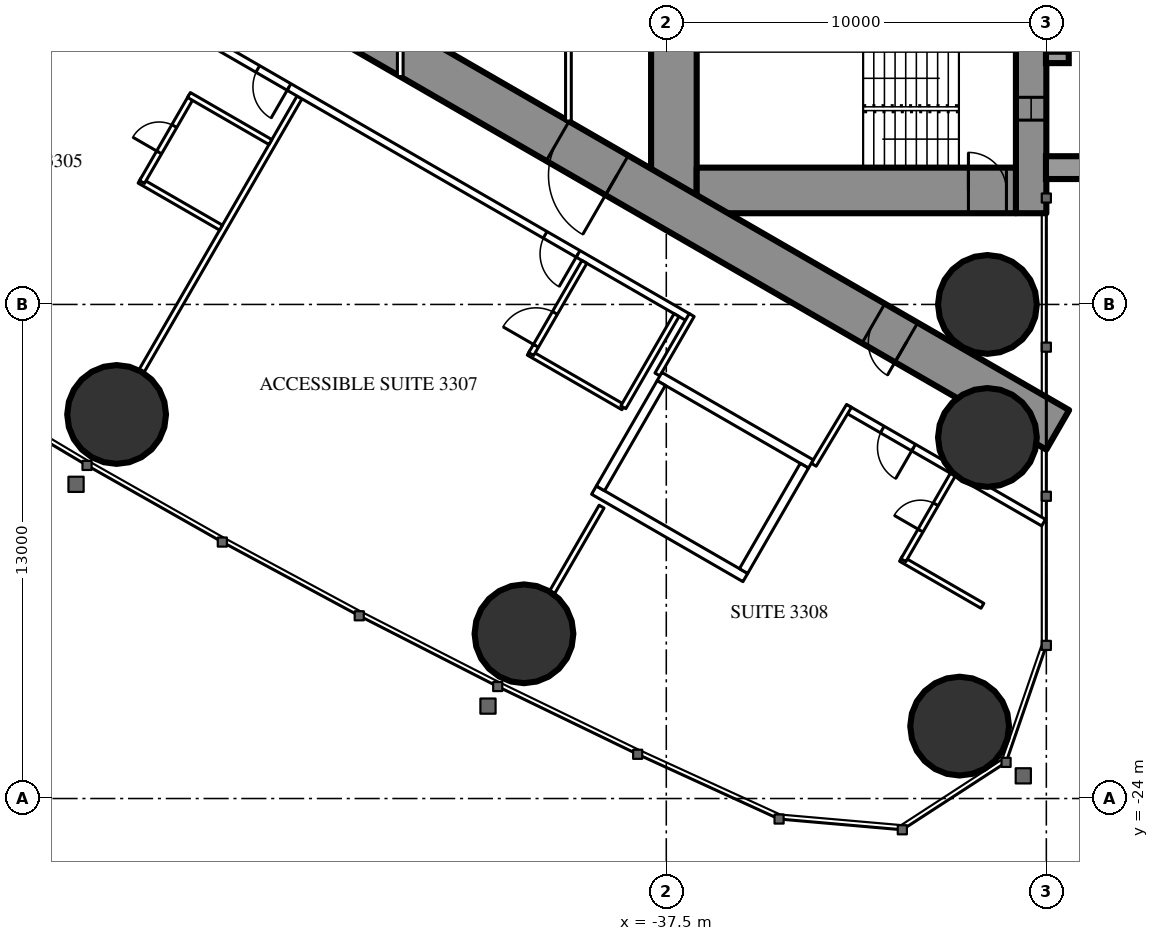
"""IFC4 building model, lengths in metres.
Left out: names, types, materials, properties, quantities, classifications, styles, units other than length and angle.
Written with IfcOpenShell. Run it as: python <this file> out.ifc"""

import sys

from ifc_helpers import new_model, si_unit, direction, frame, frame_2d, origin, origin_2d, place, context, subcontext, project, spatial, rectangle, hollow_circle, extrude, element, fill, save


model = new_model("IFC4")
c1 = context("Model", 3, precision=1e-05, world=origin(), true_north=direction((0.0, 1.0)))
c2 = subcontext(c1, "Body", "Model", "MODEL_VIEW")
j1 = project(units=[si_unit("LENGTHUNIT", "METRE"), si_unit("PLANEANGLEUNIT", "RADIAN")], contexts=[c1])
p1 = place(None, origin())
s1 = spatial("IfcSite", under=j1, at=p1, CompositionType="ELEMENT")
p2 = place(p1, origin())
s2 = spatial("IfcBuilding", under=s1, at=p2, CompositionType="ELEMENT")
p3 = place(p2, frame((0.0, 0.0, 125.6)))
s3 = spatial("IfcBuildingStorey", under=s2, at=p3, CompositionType="ELEMENT", Elevation=125.6)
for number, where, z_axis, x_axis in (
    (1, (-29.781, -22.095, 0.0), (0.0, 0.0, 1.0), (1.0, 0.0, 0.0)),
    (2, (-29.05, -11.0, 0.0), (0.0, 0.0, 1.0), (1.0, 0.0, 0.0)),
    (3, (-29.05, -14.5, 0.0), (0.0, 0.0, 1.0), (1.0, 0.0, 0.0)),
    (4, (-51.963, -13.895, 0.0), (0.0, 0.0, 1.0), (1.0, 0.0, 0.0)),
    (5, (-41.245, -19.666, 0.0), (0.0, 0.0, 1.0), (1.0, 0.0, 0.0)),
):
    element("IfcColumn", number, at=place(p3, frame(where, z_axis=z_axis, x_axis=x_axis)), inside=s3, PredefinedType="COLUMN", context=c2, shape_type="SweptSolid", body=[
        extrude(hollow_circle(Radius=1.3, WallThickness=0.1, at=origin_2d()), origin(), (0.0, 0.0, 1.0), 3.5),
    ])
p4 = place(p3, frame((-27.9, 8.6, 0.0), z_axis=(0.0, 0.0, 1.0), x_axis=(0.0, -1.0, 0.0)))
e6 = element("IfcWall", 6, at=p4, inside=s3, PredefinedType="SHEAR", context=c2, shape_type="SweptSolid", body=[
    extrude(rectangle(XDim=17.2, YDim=0.8, at=frame_2d((8.6, 0.0))), origin(), (0.0, 0.0, 1.0), 3.5),
])
p5 = place(p4, frame((2.45, 0.0, 0.6)))
e7 = element("IfcOpeningElement", 7, at=p5, cuts=e6, PredefinedType="OPENING", context=c2, shape_type="SweptSolid", body=[
    extrude(rectangle(XDim=0.6, YDim=2.1, at=frame_2d((0.3, 1.05))), frame((0.0, 0.41, 0.0), z_axis=(0.0, -1.0, 0.0), x_axis=(1.0, 0.0, 0.0)), (0.0, 0.0, 1.0), 0.82),
])
p6 = place(p4, frame((14.15, 0.0, 0.6)))
e8 = element("IfcOpeningElement", 8, at=p6, cuts=e6, PredefinedType="OPENING", context=c2, shape_type="SweptSolid", body=[
    extrude(rectangle(XDim=0.6, YDim=2.1, at=frame_2d((0.3, 1.05))), frame((0.0, 0.41, 0.0), z_axis=(0.0, -1.0, 0.0), x_axis=(1.0, 0.0, 0.0)), (0.0, 0.0, 1.0), 0.82),
])
p7 = place(p3, frame((-37.3, 8.6, 0.0), z_axis=(0.0, 0.0, 1.0), x_axis=(0.0, -1.0, 0.0)))
e9 = element("IfcWall", 9, at=p7, inside=s3, PredefinedType="SHEAR", context=c2, shape_type="SweptSolid", body=[
    extrude(rectangle(XDim=17.2, YDim=1.2, at=frame_2d((8.6, 0.0))), origin(), (0.0, 0.0, 1.0), 3.5),
])
p8 = place(p7, frame((7.7, 0.0, 0.0)))
e10 = element("IfcOpeningElement", 10, at=p8, cuts=e9, PredefinedType="OPENING", context=c2, shape_type="SweptSolid", body=[
    extrude(rectangle(XDim=1.8, YDim=2.2, at=frame_2d((0.9, 1.1))), frame((0.0, 0.61, 0.0), z_axis=(0.0, -1.0, 0.0), x_axis=(1.0, 0.0, 0.0)), (0.0, 0.0, 1.0), 1.22),
])
p9 = place(p3, frame((-28.3, -8.0, 0.0), z_axis=(0.0, 0.0, 1.0), x_axis=(-1.0, 0.0, 0.0)))
e11 = element("IfcWall", 11, at=p9, inside=s3, PredefinedType="SHEAR", context=c2, shape_type="SweptSolid", body=[
    extrude(rectangle(XDim=8.4, YDim=1.2, at=frame_2d((4.2, 0.0))), origin(), (0.0, 0.0, 1.0), 3.5),
])
p10 = place(p9, frame((0.25, 0.0, 0.0)))
e12 = element("IfcOpeningElement", 12, at=p10, cuts=e11, PredefinedType="OPENING", context=c2, shape_type="SweptSolid", body=[
    extrude(rectangle(XDim=1.0, YDim=2.2, at=frame_2d((0.5, 1.1))), frame((0.0, 0.61, 0.0), z_axis=(0.0, -1.0, 0.0), x_axis=(1.0, 0.0, 0.0)), (0.0, 0.0, 1.0), 1.22),
])
p11 = place(p3, frame((-27.2, -14.3, 0.0), z_axis=(0.0, 0.0, 1.0), x_axis=(-0.866024021859, 0.500002393557, 0.0)))
e13 = element("IfcWall", 13, at=p11, inside=s3, PredefinedType="SHEAR", context=c2, shape_type="SweptSolid", body=[
    extrude(rectangle(XDim=27.907, YDim=1.2, at=frame_2d((13.954, 0.0))), origin(), (0.0, 0.0, 1.0), 3.5),
])
p12 = place(p11, frame((4.6, 0.0, 0.0)))
e14 = element("IfcOpeningElement", 14, at=p12, cuts=e13, PredefinedType="OPENING", context=c2, shape_type="SweptSolid", body=[
    extrude(rectangle(XDim=1.0, YDim=2.2, at=frame_2d((0.5, 1.1))), frame((0.0, 0.61, 0.0), z_axis=(0.0, -1.0, 0.0), x_axis=(1.0, 0.0, 0.0)), (0.0, 0.0, 1.0), 1.22),
])
p13 = place(p11, frame((13.395, 0.0, 0.0)))
e15 = element("IfcOpeningElement", 15, at=p13, cuts=e13, PredefinedType="OPENING", context=c2, shape_type="SweptSolid", body=[
    extrude(rectangle(XDim=1.8, YDim=2.2, at=frame_2d((0.9, 1.1))), frame((0.0, 0.61, 0.0), z_axis=(0.0, -1.0, 0.0), x_axis=(1.0, 0.0, 0.0)), (0.0, 0.0, 1.0), 1.22),
])
p14 = place(p3, frame((-47.151, -5.552, 0.0), z_axis=(0.0, 0.0, 1.0), x_axis=(-0.500003012045, -0.866023664773, 0.0)))
e16 = element("IfcWall", 16, at=p14, inside=s3, PredefinedType="PARTITIONING", context=c2, shape_type="SweptSolid", body=[
    extrude(rectangle(XDim=8.311, YDim=0.15, at=frame_2d((4.156, 0.0))), origin(), (0.0, 0.0, 1.0), 2.2),
])
p15 = place(p3, frame((-39.202, -16.32, 0.0), z_axis=(0.0, 0.0, 1.0), x_axis=(-0.49997716683, -0.86603858612, 0.0)))
e17 = element("IfcWall", 17, at=p15, inside=s3, PredefinedType="PARTITIONING", context=c2, shape_type="SweptSolid", body=[
    extrude(rectangle(XDim=2.6, YDim=0.15, at=frame_2d((1.3, 0.0))), origin(), (0.0, 0.0, 1.0), 3.25),
])
p16 = place(p3, frame((-27.572, -16.741, 0.0), z_axis=(0.0, 0.0, 1.0), x_axis=(-0.866024464444, 0.500001626982, 0.0)))
e18 = element("IfcWall", 18, at=p16, inside=s3, PredefinedType="PARTITIONING", context=c2, shape_type="SweptSolid", body=[
    extrude(rectangle(XDim=5.955, YDim=0.2, at=frame_2d((2.978, 0.0))), origin(), (0.0, 0.0, 1.0), 3.25),
])
p17 = place(p16, frame((3.95, 0.0, 0.0)))
e19 = element("IfcOpeningElement", 19, at=p17, cuts=e18, PredefinedType="OPENING", context=c2, shape_type="SweptSolid", body=[
    extrude(rectangle(XDim=0.95, YDim=2.2, at=frame_2d((0.475, 1.1))), frame((0.0, 0.11, 0.0), z_axis=(0.0, -1.0, 0.0), x_axis=(1.0, 0.0, 0.0)), (0.0, 0.0, 1.0), 0.22),
])
p18 = place(p3, frame((-36.92, -11.344, 0.0), z_axis=(0.0, 0.0, 1.0), x_axis=(-0.866028313256, 0.499994960614, 0.0)))
e20 = element("IfcWall", 20, at=p18, inside=s3, PredefinedType="PARTITIONING", context=c2, shape_type="SweptSolid", body=[
    extrude(rectangle(XDim=22.568, YDim=0.2, at=frame_2d((11.284, 0.0))), origin(), (0.0, 0.0, 1.0), 3.25),
])
p19 = place(p18, frame((12.131, 0.0, 0.0)))
e21 = element("IfcOpeningElement", 21, at=p19, cuts=e20, PredefinedType="OPENING", context=c2, shape_type="SweptSolid", body=[
    extrude(rectangle(XDim=0.95, YDim=2.2, at=frame_2d((0.475, 1.1))), frame((0.0, 0.11, 0.0), z_axis=(0.0, -1.0, 0.0), x_axis=(1.0, 0.0, 0.0)), (0.0, 0.0, 1.0), 0.22),
])
p20 = place(p18, frame((3.35, 0.0, 0.0)))
e22 = element("IfcOpeningElement", 22, at=p20, cuts=e20, PredefinedType="OPENING", context=c2, shape_type="SweptSolid", body=[
    extrude(rectangle(XDim=1.0, YDim=2.2, at=frame_2d((0.5, 1.1))), frame((0.0, 0.11, 0.0), z_axis=(0.0, -1.0, 0.0), x_axis=(1.0, 0.0, 0.0)), (0.0, 0.0, 1.0), 0.22),
])
p21 = place(p3, frame((-36.831, -11.28, 0.0), z_axis=(0.0, 0.0, 1.0), x_axis=(-0.499937177781, -0.866061671171, 0.0)))
e23 = element("IfcWall", 23, at=p21, inside=s3, PredefinedType="PARTITIONING", context=c2, shape_type="SweptSolid", body=[
    extrude(rectangle(XDim=1.804, YDim=0.15, at=frame_2d((0.902, 0.0))), origin(), (0.0, 0.0, 1.0), 3.25),
])
p22 = place(p3, frame((-33.621, -15.218, 0.0), z_axis=(0.0, 0.0, 1.0), x_axis=(0.514336634837, 0.857588377991, 0.0)))
e24 = element("IfcWall", 24, at=p22, inside=s3, PredefinedType="PARTITIONING", context=c2, shape_type="SweptSolid", body=[
    extrude(rectangle(XDim=1.805, YDim=0.15, at=frame_2d((0.903, 0.0))), origin(), (0.0, 0.0, 1.0), 3.25),
])
p23 = place(p3, frame((-49.216, -8.979, 0.0), z_axis=(0.0, 0.0, 1.0), x_axis=(-0.866031185235, 0.4999899861, 0.0)))
e25 = element("IfcWall", 25, at=p23, inside=s3, PredefinedType="PARTITIONING", context=c2, shape_type="SweptSolid", body=[
    extrude(rectangle(XDim=2.475, YDim=0.15, at=frame_2d((1.238, 0.0))), origin(), (0.0, 0.0, 1.0), 3.25),
])
p24 = place(p3, frame((-49.995, -5.527, 0.0), z_axis=(0.0, 0.0, 1.0), x_axis=(-0.500006934395, -0.866021400173, 0.0)))
e26 = element("IfcWall", 26, at=p24, inside=s3, PredefinedType="PARTITIONING", context=c2, shape_type="SweptSolid", body=[
    extrude(rectangle(XDim=2.6, YDim=0.15, at=frame_2d((1.3, 0.0))), origin(), (0.0, 0.0, 1.0), 3.25),
])
p25 = place(p24, frame((0.9, 0.0, 0.0)))
e27 = element("IfcOpeningElement", 27, at=p25, cuts=e26, PredefinedType="OPENING", context=c2, shape_type="SweptSolid", body=[
    extrude(rectangle(XDim=0.8, YDim=2.2, at=frame_2d((0.4, 1.1))), frame((0.0, 0.085, 0.0), z_axis=(0.0, -1.0, 0.0), x_axis=(1.0, 0.0, 0.0)), (0.0, 0.0, 1.0), 0.17),
])
p26 = place(p3, frame((-47.916, -6.727, 0.0), z_axis=(0.0, 0.0, 1.0), x_axis=(-0.866031185235, 0.4999899861, 0.0)))
e28 = element("IfcWall", 28, at=p26, inside=s3, PredefinedType="PARTITIONING", context=c2, shape_type="SweptSolid", body=[
    extrude(rectangle(XDim=2.475, YDim=0.15, at=frame_2d((1.238, 0.0))), origin(), (0.0, 0.0, 1.0), 3.25),
])
p27 = place(p3, frame((-38.63, -13.705, 0.0), z_axis=(0.0, 0.0, 1.0), x_axis=(-0.866018712932, 0.500011588718, 0.0)))
e29 = element("IfcWall", 29, at=p27, inside=s3, PredefinedType="PARTITIONING", context=c2, shape_type="SweptSolid", body=[
    extrude(rectangle(XDim=2.875, YDim=0.15, at=frame_2d((1.438, 0.0))), origin(), (0.0, 0.0, 1.0), 3.25),
])
p28 = place(p3, frame((-39.655, -9.88, 0.0), z_axis=(0.0, 0.0, 1.0), x_axis=(-0.500049511043, -0.865996816683, 0.0)))
e30 = element("IfcWall", 30, at=p28, inside=s3, PredefinedType="PARTITIONING", context=c2, shape_type="SweptSolid", body=[
    extrude(rectangle(XDim=2.8, YDim=0.15, at=frame_2d((1.4, 0.0))), origin(), (0.0, 0.0, 1.0), 3.25),
])
p29 = place(p28, frame((1.55, 0.0, 0.0)))
e31 = element("IfcOpeningElement", 31, at=p29, cuts=e30, PredefinedType="OPENING", context=c2, shape_type="SweptSolid", body=[
    extrude(rectangle(XDim=1.0, YDim=2.2, at=frame_2d((0.5, 1.1))), frame((0.0, 0.085, 0.0), z_axis=(0.0, -1.0, 0.0), x_axis=(1.0, 0.0, 0.0)), (0.0, 0.0, 1.0), 0.17),
])
p30 = place(p3, frame((-37.23, -11.281, 0.0), z_axis=(0.0, 0.0, 1.0), x_axis=(-0.500049511043, -0.865996816683, 0.0)))
e32 = element("IfcWall", 32, at=p30, inside=s3, PredefinedType="PARTITIONING", context=c2, shape_type="SweptSolid", body=[
    extrude(rectangle(XDim=2.8, YDim=0.15, at=frame_2d((1.4, 0.0))), origin(), (0.0, 0.0, 1.0), 3.25),
])
p31 = place(p3, frame((-29.182, -18.929, 0.0), z_axis=(0.0, 0.0, 1.0), x_axis=(-0.866006523861, 0.500032699561, 0.0)))
e33 = element("IfcWall", 33, at=p31, inside=s3, PredefinedType="PARTITIONING", context=c2, shape_type="SweptSolid", body=[
    extrude(rectangle(XDim=2.475, YDim=0.15, at=frame_2d((1.237, 0.0))), origin(), (0.0, 0.0, 1.0), 3.25),
])
p32 = place(p3, frame((-29.96, -15.478, 0.0), z_axis=(0.0, 0.0, 1.0), x_axis=(-0.500006934395, -0.866021400173, 0.0)))
e34 = element("IfcWall", 34, at=p32, inside=s3, PredefinedType="PARTITIONING", context=c2, shape_type="SweptSolid", body=[
    extrude(rectangle(XDim=2.6, YDim=0.15, at=frame_2d((1.3, 0.0))), origin(), (0.0, 0.0, 1.0), 3.25),
])
p33 = place(p32, frame((0.9, 0.0, 0.0)))
e35 = element("IfcOpeningElement", 35, at=p33, cuts=e34, PredefinedType="OPENING", context=c2, shape_type="SweptSolid", body=[
    extrude(rectangle(XDim=0.8, YDim=2.2, at=frame_2d((0.4, 1.1))), frame((0.0, 0.085, 0.0), z_axis=(0.0, -1.0, 0.0), x_axis=(1.0, 0.0, 0.0)), (0.0, 0.0, 1.0), 0.17),
])
p34 = place(p3, frame((-40.075, 1.2, 0.0), z_axis=(0.0, 0.0, 1.0), x_axis=(0.0, -1.0, 0.0)))
e36 = element("IfcWall", 36, at=p34, inside=s3, PredefinedType="PARTITIONING", context=c2, shape_type="SweptSolid", body=[
    extrude(rectangle(XDim=7.374, YDim=0.15, at=frame_2d((3.687, 0.0))), origin(), (0.0, 0.0, 1.0), 3.25),
])
p35 = place(p34, frame((2.787, 0.0, 0.0)))
e37 = element("IfcOpeningElement", 37, at=p35, cuts=e36, PredefinedType="OPENING", context=c2, shape_type="SweptSolid", body=[
    extrude(rectangle(XDim=1.8, YDim=2.2, at=frame_2d((0.9, 1.1))), frame((0.0, 0.085, 0.0), z_axis=(0.0, -1.0, 0.0), x_axis=(1.0, 0.0, 0.0)), (0.0, 0.0, 1.0), 0.17),
])
p36 = place(p3, frame((-44.5, 5.005, 0.0), z_axis=(0.0, 0.0, 1.0), x_axis=(0.0, -1.0, 0.0)))
e38 = element("IfcWall", 38, at=p36, inside=s3, PredefinedType="PARTITIONING", context=c2, shape_type="SweptSolid", body=[
    extrude(rectangle(XDim=10.009, YDim=0.15, at=frame_2d((5.005, 0.0))), origin(), (0.0, 0.0, 1.0), 2.45),
])
p37 = place(p36, frame((2.002, 0.0, 0.0)))
e39 = element("IfcOpeningElement", 39, at=p37, cuts=e38, PredefinedType="OPENING", context=c2, shape_type="SweptSolid", body=[
    extrude(rectangle(XDim=1.0, YDim=2.2, at=frame_2d((0.5, 1.1))), frame((0.0, 0.085, 0.0), z_axis=(0.0, -1.0, 0.0), x_axis=(1.0, 0.0, 0.0)), (0.0, 0.0, 1.0), 0.17),
])
p38 = place(p36, frame((7.007, 0.0, 0.0)))
e40 = element("IfcOpeningElement", 40, at=p38, cuts=e38, PredefinedType="OPENING", context=c2, shape_type="SweptSolid", body=[
    extrude(rectangle(XDim=1.0, YDim=2.2, at=frame_2d((0.5, 1.1))), frame((0.0, 0.085, 0.0), z_axis=(0.0, -1.0, 0.0), x_axis=(1.0, 0.0, 0.0)), (0.0, 0.0, 1.0), 0.17),
])
p39 = place(p3, frame((-33.696, -15.197, 0.0), z_axis=(0.0, 0.0, 1.0), x_axis=(-0.865976953817, 0.500083908417, 0.0)))
e41 = element("IfcWall", 41, at=p39, inside=s3, PredefinedType="PARTITIONING", context=c2, shape_type="SweptSolid", body=[
    extrude(rectangle(XDim=4.599, YDim=0.25, at=frame_2d((2.3, 0.0))), origin(), (0.0, 0.0, 1.0), 3.25),
])
p40 = place(p3, frame((-35.42, -18.186, 0.0), z_axis=(0.0, 0.0, 1.0), x_axis=(-0.865990227814, 0.50006092162, 0.0)))
e42 = element("IfcWall", 42, at=p40, inside=s3, PredefinedType="PARTITIONING", context=c2, shape_type="SweptSolid", body=[
    extrude(rectangle(XDim=4.6, YDim=0.25, at=frame_2d((2.3, 0.0))), origin(), (0.0, 0.0, 1.0), 3.25),
])
p41 = place(p3, frame((-33.866, -15.243, 0.0), z_axis=(0.0, 0.0, 1.0), x_axis=(-0.499929347863, -0.866066190972, 0.0)))
e43 = element("IfcWall", 43, at=p41, inside=s3, PredefinedType="PARTITIONING", context=c2, shape_type="SweptSolid", body=[
    extrude(rectangle(XDim=3.201, YDim=0.25, at=frame_2d((1.6, 0.0))), origin(), (0.0, 0.0, 1.0), 3.25),
])
p42 = place(p3, frame((-37.633, -13.068, 0.0), z_axis=(0.0, 0.0, 1.0), x_axis=(-0.499872130319, -0.866099216793, 0.0)))
e44 = element("IfcWall", 44, at=p42, inside=s3, PredefinedType="PARTITIONING", context=c2, shape_type="SweptSolid", body=[
    extrude(rectangle(XDim=3.2, YDim=0.25, at=frame_2d((1.6, 0.0))), origin(), (0.0, 0.0, 1.0), 3.25),
])
p43 = place(p25, origin())
e45 = element("IfcDoor", 45, at=p43, inside=s3, OperationType="SINGLE_SWING_RIGHT", PredefinedType="DOOR", context=c2, shape_type="SweptSolid", body=[
    extrude(rectangle(XDim=0.8, YDim=2.2, at=frame_2d((0.4, 1.1))), frame((0.0, 0.025, 0.0), z_axis=(0.0, -1.0, 0.0), x_axis=(1.0, 0.0, 0.0)), (0.0, 0.0, 1.0), 0.05),
])
fill(e27, e45)
p44 = place(p19, origin())
e46 = element("IfcDoor", 46, at=p44, inside=s3, OperationType="SINGLE_SWING_LEFT", PredefinedType="DOOR", context=c2, shape_type="SweptSolid", body=[
    extrude(rectangle(XDim=0.95, YDim=2.2, at=frame_2d((0.475, 1.1))), frame((0.0, 0.025, 0.0), z_axis=(0.0, -1.0, 0.0), x_axis=(1.0, 0.0, 0.0)), (0.0, 0.0, 1.0), 0.05),
])
fill(e21, e46)
p45 = place(p29, origin())
e47 = element("IfcDoor", 47, at=p45, inside=s3, OperationType="SINGLE_SWING_RIGHT", PredefinedType="DOOR", context=c2, shape_type="SweptSolid", body=[
    extrude(rectangle(XDim=1.0, YDim=2.2, at=frame_2d((0.5, 1.1))), frame((0.0, 0.025, 0.0), z_axis=(0.0, -1.0, 0.0), x_axis=(1.0, 0.0, 0.0)), (0.0, 0.0, 1.0), 0.05),
])
fill(e31, e47)
p46 = place(p20, origin())
e48 = element("IfcDoor", 48, at=p46, inside=s3, OperationType="SINGLE_SWING_LEFT", PredefinedType="DOOR", context=c2, shape_type="SweptSolid", body=[
    extrude(rectangle(XDim=1.0, YDim=2.2, at=frame_2d((0.5, 1.1))), frame((0.0, 0.025, 0.0), z_axis=(0.0, -1.0, 0.0), x_axis=(1.0, 0.0, 0.0)), (0.0, 0.0, 1.0), 0.05),
])
fill(e22, e48)
p47 = place(p33, origin())
e49 = element("IfcDoor", 49, at=p47, inside=s3, OperationType="SINGLE_SWING_RIGHT", PredefinedType="DOOR", context=c2, shape_type="SweptSolid", body=[
    extrude(rectangle(XDim=0.8, YDim=2.2, at=frame_2d((0.4, 1.1))), frame((0.0, 0.025, 0.0), z_axis=(0.0, -1.0, 0.0), x_axis=(1.0, 0.0, 0.0)), (0.0, 0.0, 1.0), 0.05),
])
fill(e35, e49)
p48 = place(p17, origin())
e50 = element("IfcDoor", 50, at=p48, inside=s3, OperationType="SINGLE_SWING_LEFT", PredefinedType="DOOR", context=c2, shape_type="SweptSolid", body=[
    extrude(rectangle(XDim=0.95, YDim=2.2, at=frame_2d((0.475, 1.1))), frame((0.0, 0.025, 0.0), z_axis=(0.0, -1.0, 0.0), x_axis=(1.0, 0.0, 0.0)), (0.0, 0.0, 1.0), 0.05),
])
fill(e19, e50)
p49 = place(p12, origin())
e51 = element("IfcDoor", 51, at=p49, inside=s3, OperationType="SINGLE_SWING_LEFT", PredefinedType="DOOR", context=c2, shape_type="SweptSolid", body=[
    extrude(rectangle(XDim=1.0, YDim=2.2, at=frame_2d((0.5, 1.1))), frame((0.0, 0.025, 0.0), z_axis=(0.0, -1.0, 0.0), x_axis=(1.0, 0.0, 0.0)), (0.0, 0.0, 1.0), 0.05),
])
fill(e14, e51)
p50 = place(p13, origin())
e52 = element("IfcDoor", 52, at=p50, inside=s3, OperationType="DOUBLE_DOOR_SINGLE_SWING", PredefinedType="DOOR", context=c2, shape_type="SweptSolid", body=[
    extrude(rectangle(XDim=1.8, YDim=2.2, at=frame_2d((0.9, 1.1))), frame((0.0, 0.025, 0.0), z_axis=(0.0, -1.0, 0.0), x_axis=(1.0, 0.0, 0.0)), (0.0, 0.0, 1.0), 0.05),
])
fill(e15, e52)
p51 = place(p10, origin())
e53 = element("IfcDoor", 53, at=p51, inside=s3, OperationType="SINGLE_SWING_RIGHT", PredefinedType="DOOR", context=c2, shape_type="SweptSolid", body=[
    extrude(rectangle(XDim=1.0, YDim=2.2, at=frame_2d((0.5, 1.1))), frame((0.0, 0.025, 0.0), z_axis=(0.0, -1.0, 0.0), x_axis=(1.0, 0.0, 0.0)), (0.0, 0.0, 1.0), 0.05),
])
fill(e12, e53)
p52 = place(p6, origin())
e54 = element("IfcWindow", 54, at=p52, inside=s3, PartitioningType="SINGLE_PANEL", PredefinedType="WINDOW", context=c2, shape_type="SweptSolid", body=[
    extrude(rectangle(XDim=0.6, YDim=2.1, at=frame_2d((0.3, 1.05))), frame((0.0, 0.03, 0.0), z_axis=(0.0, -1.0, 0.0), x_axis=(1.0, 0.0, 0.0)), (0.0, 0.0, 1.0), 0.06),
])
fill(e8, e54)
save(model, sys.argv[1])
